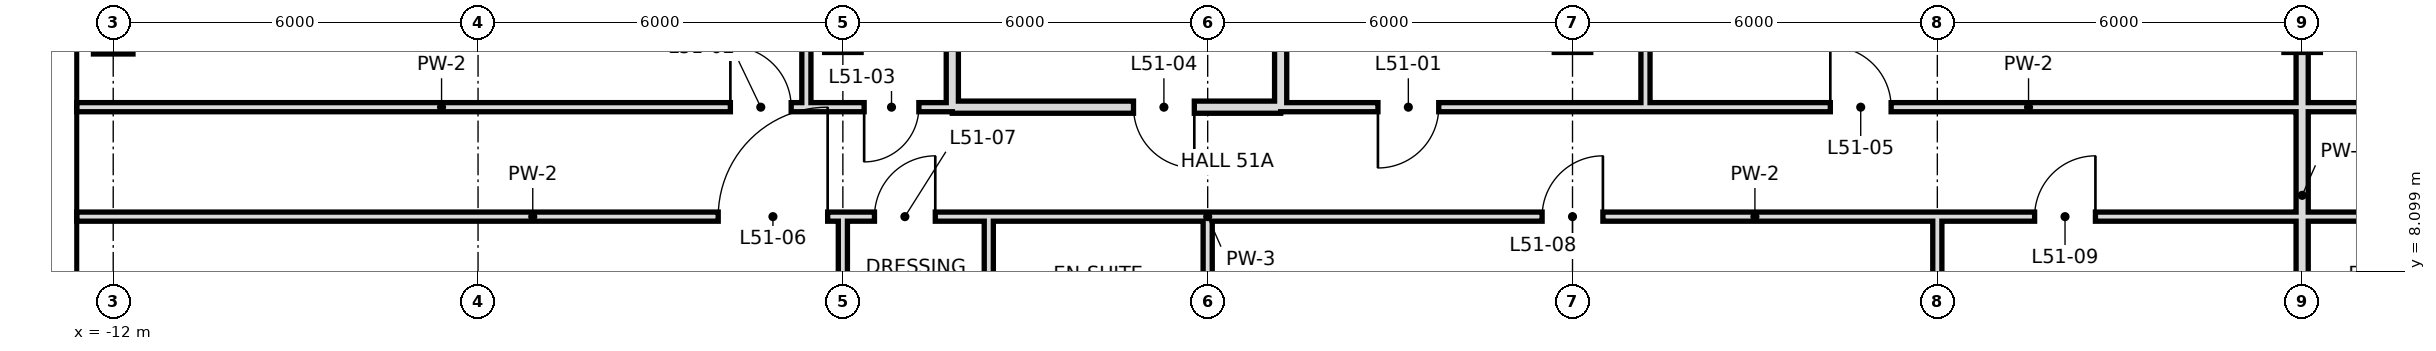
"""IFC4 building model, lengths in metres.
Left out: names, types, materials, properties, quantities, classifications, styles, units other than length and angle.
Written with IfcOpenShell. Run it as: python <this file> out.ifc"""

import sys

from ifc_helpers import new_model, si_unit, direction, frame, frame_2d, origin, origin_2d, place, context, subcontext, project, spatial, rectangle, hollow_rectangle, extrude, element, fill, save


model = new_model("IFC4")
c1 = context("Model", 3, precision=1e-05, world=origin(), true_north=direction((0.0, 1.0)))
c2 = subcontext(c1, "Body", "Model", "MODEL_VIEW")
j1 = project(units=[si_unit("LENGTHUNIT", "METRE"), si_unit("PLANEANGLEUNIT", "RADIAN")], contexts=[c1])
p1 = place(None, origin())
s1 = spatial("IfcSite", under=j1, at=p1, CompositionType="ELEMENT")
p2 = place(p1, origin())
s2 = spatial("IfcBuilding", under=s1, at=p2, CompositionType="ELEMENT")
p3 = place(p2, frame((0.0, 0.0, 219.0)))
s3 = spatial("IfcBuildingStorey", under=s2, at=p3, CompositionType="ELEMENT", Elevation=219.0)
p4 = place(p3, frame((-12.0, 12.0, 0.0), z_axis=(0.0, 0.0, 1.0), x_axis=(1.0, 0.0, 0.0)))
e1 = element("IfcColumn", 1, at=p4, inside=s3, PredefinedType="COLUMN", context=c2, shape_type="SweptSolid", body=[
    extrude(hollow_rectangle(XDim=0.65, YDim=0.65, WallThickness=0.032, at=origin_2d()), origin(), (0.0, 0.0, 1.0), 3.6),
])
p5 = place(p3, frame((-0.6, 10.8, 0.0), z_axis=(0.0, 0.0, 1.0), x_axis=(0.0, 1.0, 0.0)))
e2 = element("IfcWall", 2, at=p5, inside=s3, PredefinedType="PARTITIONING", context=c2, shape_type="SweptSolid", body=[
    extrude(rectangle(XDim=7.2, YDim=0.15, at=frame_2d((3.6, 0.0))), origin(), (0.0, 0.0, 1.0), 3.42),
])
p6 = place(p3, frame((0.0, 0.0, 0.0), z_axis=(0.0, 0.0, 1.0), x_axis=(0.0, 1.0, 0.0)))
e3 = element("IfcWall", 3, at=p6, inside=s3, PredefinedType="PARTITIONING", context=c2, shape_type="SweptSolid", body=[
    extrude(rectangle(XDim=9.0, YDim=0.15, at=frame_2d((4.5, 0.0))), origin(), (0.0, 0.0, 1.0), 2.72),
])
p7 = place(p3, frame((1.8, 10.8, 0.0), z_axis=(0.0, 0.0, 1.0), x_axis=(0.0, 1.0, 0.0)))
e4 = element("IfcWall", 4, at=p7, inside=s3, PredefinedType="SOLIDWALL", context=c2, shape_type="SweptSolid", body=[
    extrude(rectangle(XDim=7.2, YDim=0.2, at=frame_2d((3.6, 0.0))), origin(), (0.0, 0.0, 1.0), 3.42),
])
p8 = place(p3, frame((13.2, 10.8, 0.0), z_axis=(0.0, 0.0, 1.0), x_axis=(0.0, 1.0, 0.0)))
e5 = element("IfcWall", 5, at=p8, inside=s3, PredefinedType="PARTITIONING", context=c2, shape_type="SweptSolid", body=[
    extrude(rectangle(XDim=7.9, YDim=0.15, at=frame_2d((3.95, 0.0))), origin(), (0.0, 0.0, 1.0), 3.42),
])
p9 = place(p3, frame((18.0, -0.6, 0.0), z_axis=(0.0, 0.0, 1.0), x_axis=(0.0, 1.0, 0.0)))
e6 = element("IfcWall", 6, at=p9, inside=s3, PredefinedType="PARTITIONING", context=c2, shape_type="SweptSolid", body=[
    extrude(rectangle(XDim=9.6, YDim=0.15, at=frame_2d((4.8, 0.0))), origin(), (0.0, 0.0, 1.0), 2.72),
])
p10 = place(p3, frame((2.4, 6.0, 0.0), z_axis=(0.0, 0.0, 1.0), x_axis=(0.0, 1.0, 0.0)))
e7 = element("IfcWall", 7, at=p10, inside=s3, PredefinedType="PARTITIONING", context=c2, shape_type="SweptSolid", body=[
    extrude(rectangle(XDim=3.0, YDim=0.15, at=frame_2d((1.5, 0.0))), origin(), (0.0, 0.0, 1.0), 3.42),
])
p11 = place(p3, frame((24.0, 0.0, 0.0), z_axis=(0.0, 0.0, 1.0), x_axis=(0.0, 1.0, 0.0)))
e8 = element("IfcWall", 8, at=p11, inside=s3, PredefinedType="SOLIDWALL", context=c2, shape_type="SweptSolid", body=[
    extrude(rectangle(XDim=18.7, YDim=0.2, at=frame_2d((9.35, 0.0))), origin(), (0.0, 0.0, 1.0), 2.72),
])
p12 = place(p3, frame((6.0, 6.0, 0.0), z_axis=(0.0, 0.0, 1.0), x_axis=(0.0, 1.0, 0.0)))
e9 = element("IfcWall", 9, at=p12, inside=s3, PredefinedType="PARTITIONING", context=c2, shape_type="SweptSolid", body=[
    extrude(rectangle(XDim=3.0, YDim=0.15, at=frame_2d((1.5, 0.0))), origin(), (0.0, 0.0, 1.0), 2.72),
])
p13 = place(p3, frame((7.2, 10.8, 0.0), z_axis=(0.0, 0.0, 1.0), x_axis=(0.0, 1.0, 0.0)))
e10 = element("IfcWall", 10, at=p13, inside=s3, PredefinedType="SOLIDWALL", context=c2, shape_type="SweptSolid", body=[
    extrude(rectangle(XDim=7.9, YDim=0.2, at=frame_2d((3.95, 0.0))), origin(), (0.0, 0.0, 1.0), 2.72),
])
p14 = place(p3, frame((1.8, 10.8, 0.0), z_axis=(0.0, 0.0, 1.0), x_axis=(1.0, 0.0, 0.0)))
e11 = element("IfcWall", 11, at=p14, inside=s3, PredefinedType="SOLIDWALL", context=c2, shape_type="SweptSolid", body=[
    extrude(rectangle(XDim=5.4, YDim=0.2, at=frame_2d((2.7, 0.0))), origin(), (0.0, 0.0, 1.0), 2.72),
])
p15 = place(p14, frame((2.98, 0.0, 0.0)))
e12 = element("IfcOpeningElement", 12, at=p15, cuts=e11, PredefinedType="OPENING", context=c2, shape_type="SweptSolid", body=[
    extrude(rectangle(XDim=1.0, YDim=2.4, at=frame_2d((0.5, 1.2))), frame((0.0, 0.11, 0.0), z_axis=(0.0, -1.0, 0.0), x_axis=(1.0, 0.0, 0.0)), (0.0, 0.0, 1.0), 0.22),
])
p16 = place(p3, frame((-12.6, 10.8, 0.0), z_axis=(0.0, 0.0, 1.0), x_axis=(1.0, 0.0, 0.0)))
e13 = element("IfcWall", 13, at=p16, inside=s3, PredefinedType="PARTITIONING", context=c2, shape_type="SweptSolid", body=[
    extrude(rectangle(XDim=12.0, YDim=0.15, at=frame_2d((6.0, 0.0))), origin(), (0.0, 0.0, 1.0), 3.42),
])
p17 = place(p16, frame((10.75, 0.0, 0.0)))
e14 = element("IfcOpeningElement", 14, at=p17, cuts=e13, PredefinedType="OPENING", context=c2, shape_type="SweptSolid", body=[
    extrude(rectangle(XDim=1.0, YDim=2.4, at=frame_2d((0.5, 1.2))), frame((0.0, 0.085, 0.0), z_axis=(0.0, -1.0, 0.0), x_axis=(1.0, 0.0, 0.0)), (0.0, 0.0, 1.0), 0.17),
])
p18 = place(p3, frame((7.2, 10.8, 0.0), z_axis=(0.0, 0.0, 1.0), x_axis=(1.0, 0.0, 0.0)))
e15 = element("IfcWall", 15, at=p18, inside=s3, PredefinedType="PARTITIONING", context=c2, shape_type="SweptSolid", body=[
    extrude(rectangle(XDim=24.6, YDim=0.15, at=frame_2d((12.3, 0.0))), origin(), (0.0, 0.0, 1.0), 3.42),
])
p19 = place(p18, frame((1.6, 0.0, 0.0)))
e16 = element("IfcOpeningElement", 16, at=p19, cuts=e15, PredefinedType="OPENING", context=c2, shape_type="SweptSolid", body=[
    extrude(rectangle(XDim=1.0, YDim=2.4, at=frame_2d((0.5, 1.2))), frame((0.0, 0.085, 0.0), z_axis=(0.0, -1.0, 0.0), x_axis=(1.0, 0.0, 0.0)), (0.0, 0.0, 1.0), 0.17),
])
p20 = place(p18, frame((9.04, 0.0, 0.0)))
e17 = element("IfcOpeningElement", 17, at=p20, cuts=e15, PredefinedType="OPENING", context=c2, shape_type="SweptSolid", body=[
    extrude(rectangle(XDim=1.0, YDim=2.4, at=frame_2d((0.5, 1.2))), frame((0.0, 0.085, 0.0), z_axis=(0.0, -1.0, 0.0), x_axis=(1.0, 0.0, 0.0)), (0.0, 0.0, 1.0), 0.17),
])
p21 = place(p18, frame((21.46, 0.0, 0.0)))
e18 = element("IfcOpeningElement", 18, at=p21, cuts=e15, PredefinedType="OPENING", context=c2, shape_type="SweptSolid", body=[
    extrude(rectangle(XDim=1.0, YDim=2.4, at=frame_2d((0.5, 1.2))), frame((0.0, 0.085, 0.0), z_axis=(0.0, -1.0, 0.0), x_axis=(1.0, 0.0, 0.0)), (0.0, 0.0, 1.0), 0.17),
])
p22 = place(p3, frame((-0.6, 10.8, 0.0), z_axis=(0.0, 0.0, 1.0), x_axis=(1.0, 0.0, 0.0)))
e19 = element("IfcWall", 19, at=p22, inside=s3, PredefinedType="PARTITIONING", context=c2, shape_type="SweptSolid", body=[
    extrude(rectangle(XDim=2.4, YDim=0.15, at=frame_2d((1.2, 0.0))), origin(), (0.0, 0.0, 1.0), 3.42),
])
p23 = place(p22, frame((0.95, 0.0, 0.0)))
e20 = element("IfcOpeningElement", 20, at=p23, cuts=e19, PredefinedType="OPENING", context=c2, shape_type="SweptSolid", body=[
    extrude(rectangle(XDim=0.9, YDim=2.4, at=frame_2d((0.45, 1.2))), frame((0.0, 0.085, 0.0), z_axis=(0.0, -1.0, 0.0), x_axis=(1.0, 0.0, 0.0)), (0.0, 0.0, 1.0), 0.17),
])
p24 = place(p3, frame((-12.6, 9.0, 0.0), z_axis=(0.0, 0.0, 1.0), x_axis=(1.0, 0.0, 0.0)))
e21 = element("IfcWall", 21, at=p24, inside=s3, PredefinedType="PARTITIONING", context=c2, shape_type="SweptSolid", body=[
    extrude(rectangle(XDim=15.0, YDim=0.15, at=frame_2d((7.5, 0.0))), origin(), (0.0, 0.0, 1.0), 3.42),
])
p25 = place(p24, frame((10.55, 0.0, 0.0)))
e22 = element("IfcOpeningElement", 22, at=p25, cuts=e21, PredefinedType="OPENING", context=c2, shape_type="SweptSolid", body=[
    extrude(rectangle(XDim=1.8, YDim=2.4, at=frame_2d((0.9, 1.2))), frame((0.0, 0.085, 0.0), z_axis=(0.0, -1.0, 0.0), x_axis=(1.0, 0.0, 0.0)), (0.0, 0.0, 1.0), 0.17),
])
p26 = place(p24, frame((13.12, 0.0, 0.0)))
e23 = element("IfcOpeningElement", 23, at=p26, cuts=e21, PredefinedType="OPENING", context=c2, shape_type="SweptSolid", body=[
    extrude(rectangle(XDim=1.0, YDim=2.4, at=frame_2d((0.5, 1.2))), frame((0.0, 0.085, 0.0), z_axis=(0.0, -1.0, 0.0), x_axis=(1.0, 0.0, 0.0)), (0.0, 0.0, 1.0), 0.17),
])
p27 = place(p3, frame((6.0, 9.0, 0.0), z_axis=(0.0, 0.0, 1.0), x_axis=(1.0, 0.0, 0.0)))
e24 = element("IfcWall", 24, at=p27, inside=s3, PredefinedType="PARTITIONING", context=c2, shape_type="SweptSolid", body=[
    extrude(rectangle(XDim=18.0, YDim=0.15, at=frame_2d((9.0, 0.0))), origin(), (0.0, 0.0, 1.0), 3.42),
])
p28 = place(p27, frame((5.5, 0.0, 0.0)))
e25 = element("IfcOpeningElement", 25, at=p28, cuts=e24, PredefinedType="OPENING", context=c2, shape_type="SweptSolid", body=[
    extrude(rectangle(XDim=1.0, YDim=2.4, at=frame_2d((0.5, 1.2))), frame((0.0, 0.085, 0.0), z_axis=(0.0, -1.0, 0.0), x_axis=(1.0, 0.0, 0.0)), (0.0, 0.0, 1.0), 0.17),
])
p29 = place(p27, frame((13.6, 0.0, 0.0)))
e26 = element("IfcOpeningElement", 26, at=p29, cuts=e24, PredefinedType="OPENING", context=c2, shape_type="SweptSolid", body=[
    extrude(rectangle(XDim=1.0, YDim=2.4, at=frame_2d((0.5, 1.2))), frame((0.0, 0.085, 0.0), z_axis=(0.0, -1.0, 0.0), x_axis=(1.0, 0.0, 0.0)), (0.0, 0.0, 1.0), 0.17),
])
p30 = place(p3, frame((2.4, 9.0, 0.0), z_axis=(0.0, 0.0, 1.0), x_axis=(1.0, 0.0, 0.0)))
e27 = element("IfcWall", 27, at=p30, inside=s3, PredefinedType="PARTITIONING", context=c2, shape_type="SweptSolid", body=[
    extrude(rectangle(XDim=3.6, YDim=0.15, at=frame_2d((1.8, 0.0))), origin(), (0.0, 0.0, 1.0), 3.42),
])
p31 = place(p3, frame((24.0, 9.0, 0.0), z_axis=(0.0, 0.0, 1.0), x_axis=(1.0, 0.0, 0.0)))
e28 = element("IfcWall", 28, at=p31, inside=s3, PredefinedType="PARTITIONING", context=c2, shape_type="SweptSolid", body=[
    extrude(rectangle(XDim=3.0, YDim=0.15, at=frame_2d((1.5, 0.0))), origin(), (0.0, 0.0, 1.0), 3.42),
])
p32 = place(p19, frame((1.0, 0.0, 0.0), z_axis=(0.0, 0.0, 1.0), x_axis=(-1.0, 0.0, 0.0)))
e29 = element("IfcDoor", 29, at=p32, inside=s3, OperationType="SINGLE_SWING_RIGHT", PredefinedType="DOOR", context=c2, shape_type="SweptSolid", body=[
    extrude(rectangle(XDim=1.0, YDim=2.4, at=frame_2d((0.5, 1.2))), frame((0.0, 0.025, 0.0), z_axis=(0.0, -1.0, 0.0), x_axis=(1.0, 0.0, 0.0)), (0.0, 0.0, 1.0), 0.05),
])
fill(e16, e29)
p33 = place(p17, origin())
e30 = element("IfcDoor", 30, at=p33, inside=s3, OperationType="SINGLE_SWING_LEFT", PredefinedType="DOOR", context=c2, shape_type="SweptSolid", body=[
    extrude(rectangle(XDim=1.0, YDim=2.4, at=frame_2d((0.5, 1.2))), frame((0.0, 0.025, 0.0), z_axis=(0.0, -1.0, 0.0), x_axis=(1.0, 0.0, 0.0)), (0.0, 0.0, 1.0), 0.05),
])
fill(e14, e30)
p34 = place(p23, frame((0.9, 0.0, 0.0), z_axis=(0.0, 0.0, 1.0), x_axis=(-1.0, 0.0, 0.0)))
e31 = element("IfcDoor", 31, at=p34, inside=s3, OperationType="SINGLE_SWING_RIGHT", PredefinedType="DOOR", context=c2, shape_type="SweptSolid", body=[
    extrude(rectangle(XDim=0.9, YDim=2.4, at=frame_2d((0.45, 1.2))), frame((0.0, 0.025, 0.0), z_axis=(0.0, -1.0, 0.0), x_axis=(1.0, 0.0, 0.0)), (0.0, 0.0, 1.0), 0.05),
])
fill(e20, e31)
p35 = place(p15, origin())
e32 = element("IfcDoor", 32, at=p35, inside=s3, OperationType="SINGLE_SWING_RIGHT", PredefinedType="DOOR", context=c2, shape_type="SweptSolid", body=[
    extrude(rectangle(XDim=1.0, YDim=2.4, at=frame_2d((0.5, 1.2))), frame((0.0, 0.025, 0.0), z_axis=(0.0, -1.0, 0.0), x_axis=(1.0, 0.0, 0.0)), (0.0, 0.0, 1.0), 0.05),
])
fill(e12, e32)
p36 = place(p20, origin())
e33 = element("IfcDoor", 33, at=p36, inside=s3, OperationType="SINGLE_SWING_LEFT", PredefinedType="DOOR", context=c2, shape_type="SweptSolid", body=[
    extrude(rectangle(XDim=1.0, YDim=2.4, at=frame_2d((0.5, 1.2))), frame((0.0, 0.025, 0.0), z_axis=(0.0, -1.0, 0.0), x_axis=(1.0, 0.0, 0.0)), (0.0, 0.0, 1.0), 0.05),
])
fill(e17, e33)
p37 = place(p25, frame((1.8, 0.0, 0.0), z_axis=(0.0, 0.0, 1.0), x_axis=(-1.0, 0.0, 0.0)))
e34 = element("IfcDoor", 34, at=p37, inside=s3, OperationType="SINGLE_SWING_LEFT", PredefinedType="DOOR", context=c2, shape_type="SweptSolid", body=[
    extrude(rectangle(XDim=1.8, YDim=2.4, at=frame_2d((0.9, 1.2))), frame((0.0, 0.025, 0.0), z_axis=(0.0, -1.0, 0.0), x_axis=(1.0, 0.0, 0.0)), (0.0, 0.0, 1.0), 0.05),
])
fill(e22, e34)
p38 = place(p26, frame((1.0, 0.0, 0.0), z_axis=(0.0, 0.0, 1.0), x_axis=(-1.0, 0.0, 0.0)))
e35 = element("IfcDoor", 35, at=p38, inside=s3, OperationType="SINGLE_SWING_LEFT", PredefinedType="DOOR", context=c2, shape_type="SweptSolid", body=[
    extrude(rectangle(XDim=1.0, YDim=2.4, at=frame_2d((0.5, 1.2))), frame((0.0, 0.025, 0.0), z_axis=(0.0, -1.0, 0.0), x_axis=(1.0, 0.0, 0.0)), (0.0, 0.0, 1.0), 0.05),
])
fill(e23, e35)
p39 = place(p28, frame((1.0, 0.0, 0.0), z_axis=(0.0, 0.0, 1.0), x_axis=(-1.0, 0.0, 0.0)))
e36 = element("IfcDoor", 36, at=p39, inside=s3, OperationType="SINGLE_SWING_LEFT", PredefinedType="DOOR", context=c2, shape_type="SweptSolid", body=[
    extrude(rectangle(XDim=1.0, YDim=2.4, at=frame_2d((0.5, 1.2))), frame((0.0, 0.025, 0.0), z_axis=(0.0, -1.0, 0.0), x_axis=(1.0, 0.0, 0.0)), (0.0, 0.0, 1.0), 0.05),
])
fill(e25, e36)
p40 = place(p29, frame((1.0, 0.0, 0.0), z_axis=(0.0, 0.0, 1.0), x_axis=(-1.0, 0.0, 0.0)))
e37 = element("IfcDoor", 37, at=p40, inside=s3, OperationType="SINGLE_SWING_LEFT", PredefinedType="DOOR", context=c2, shape_type="SweptSolid", body=[
    extrude(rectangle(XDim=1.0, YDim=2.4, at=frame_2d((0.5, 1.2))), frame((0.0, 0.025, 0.0), z_axis=(0.0, -1.0, 0.0), x_axis=(1.0, 0.0, 0.0)), (0.0, 0.0, 1.0), 0.05),
])
fill(e26, e37)
save(model, sys.argv[1])
